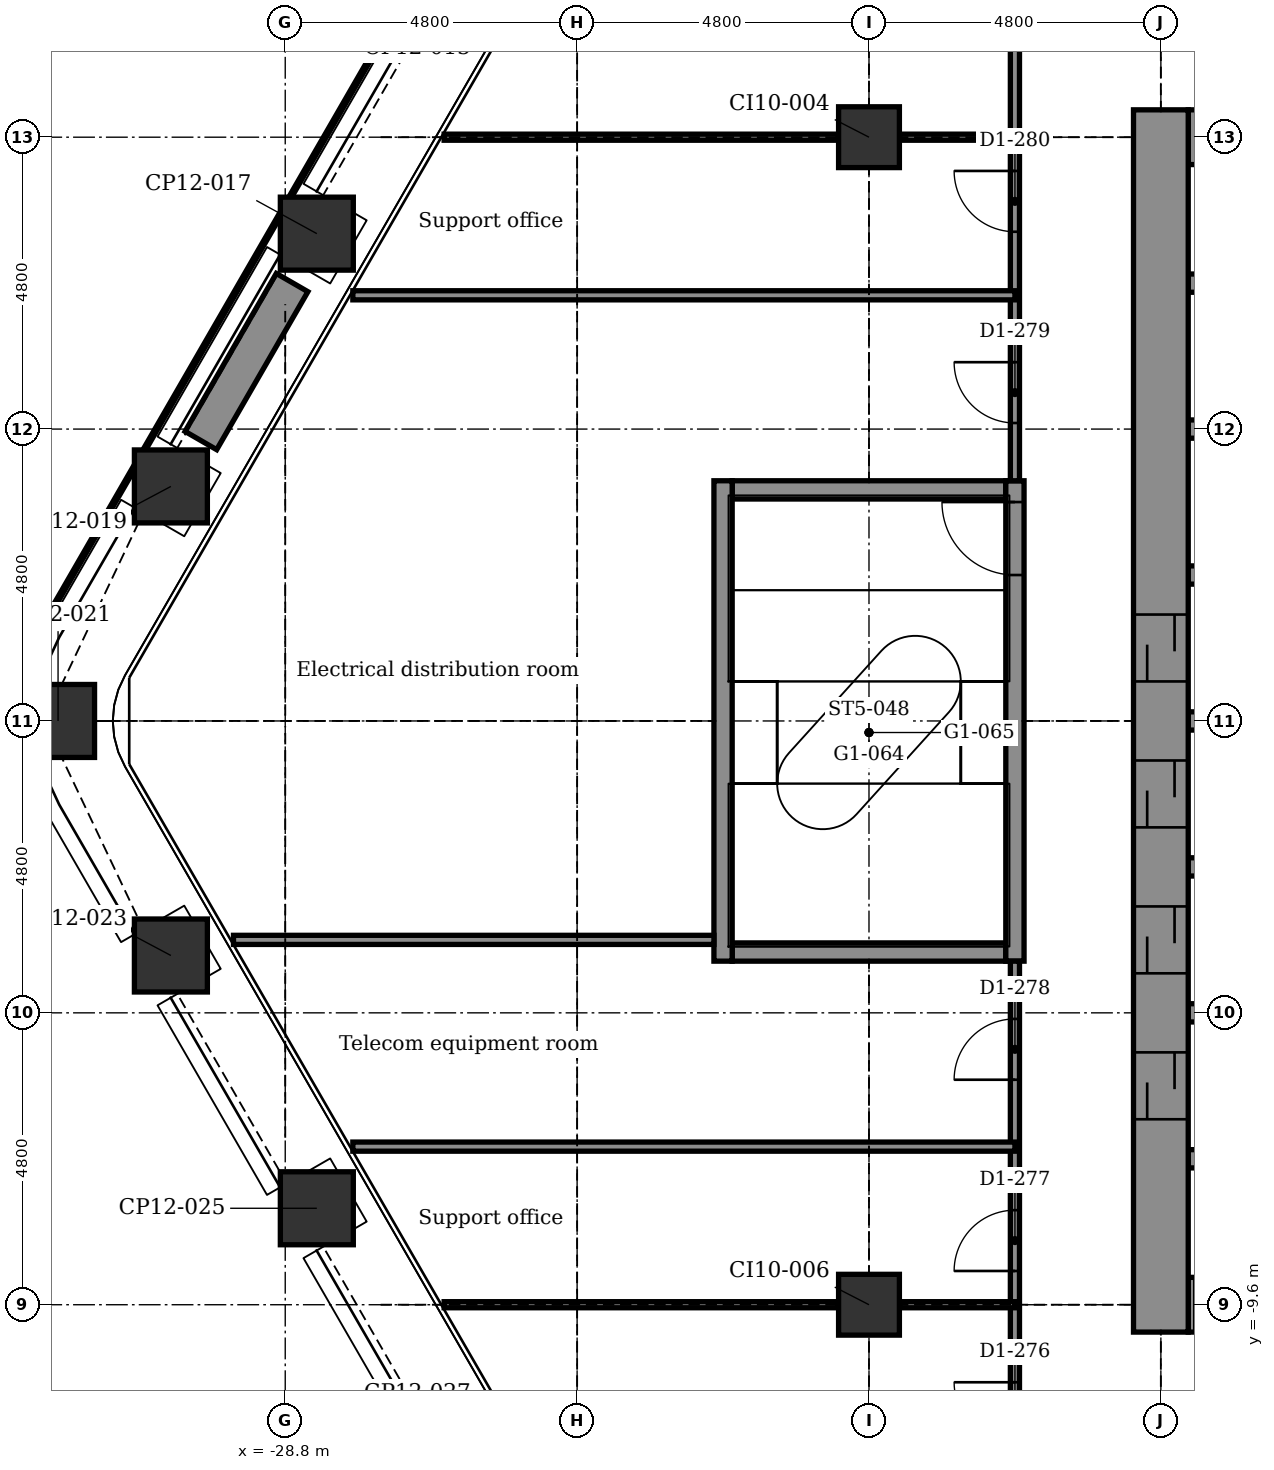
"""IFC4 building model, lengths in metres.
Left out: names, types, materials, properties, quantities, classifications, styles, units other than length and angle.
Written with IfcOpenShell. Run it as: python <this file> out.ifc"""

import sys

from ifc_helpers import new_model, si_unit, direction, frame, frame_2d, origin, origin_2d, place, context, subcontext, project, spatial, rectangle, extrude, element, fill, save


model = new_model("IFC4")
c1 = context("Model", 3, precision=1e-05, world=origin(), true_north=direction((0.0, 1.0)))
c2 = subcontext(c1, "Body", "Model", "MODEL_VIEW")
j1 = project(units=[si_unit("LENGTHUNIT", "METRE"), si_unit("PLANEANGLEUNIT", "RADIAN")], contexts=[c1])
p1 = place(None, origin())
s1 = spatial("IfcSite", under=j1, at=p1, CompositionType="ELEMENT")
p2 = place(p1, origin())
s2 = spatial("IfcBuilding", under=s1, at=p2, CompositionType="ELEMENT")
p3 = place(p2, frame((0.0, 0.0, 95.9)))
s3 = spatial("IfcBuildingStorey", under=s2, at=p3, CompositionType="ELEMENT", Elevation=95.9)
for number, where, z_axis, x_axis in (
    (1, (-28.28, -8.014, -0.2), (0.0, 0.0, 1.0), (0.866, 0.5, 0.0)),
    (2, (-30.68, -3.857, -0.2), (0.0, 0.0, 1.0), (0.866, 0.5, 0.0)),
    (3, (-32.536, 0.0, -0.2), (0.0, 0.0, 1.0), (1.0, 0.0, 0.0)),
    (4, (-30.68, 3.857, -0.2), (0.0, 0.0, 1.0), (0.5, 0.866, 0.0)),
    (5, (-28.28, 8.014, -0.2), (0.0, 0.0, 1.0), (0.5, 0.866, 0.0)),
):
    element("IfcColumn", number, at=place(p3, frame(where, z_axis=z_axis, x_axis=x_axis)), inside=s3, PredefinedType="COLUMN", context=c2, shape_type="SweptSolid", body=[
        extrude(rectangle(XDim=1.2, YDim=1.2, at=origin_2d()), origin(), (0.0, 0.0, 1.0), 4.5),
    ])
for number, where, z_axis, x_axis in (
    (6, (-19.2, -9.6, -0.2), (0.0, 0.0, 1.0), (1.0, 0.0, 0.0)),
    (7, (-19.2, 9.6, -0.2), (0.0, 0.0, 1.0), (1.0, 0.0, 0.0)),
):
    element("IfcColumn", number, at=place(p3, frame(where, z_axis=z_axis, x_axis=x_axis)), inside=s3, PredefinedType="COLUMN", context=c2, shape_type="SweptSolid", body=[
        extrude(rectangle(XDim=1.0, YDim=1.0, at=origin_2d()), origin(), (0.0, 0.0, 1.0), 4.5),
    ])
p4 = place(p3, frame((-13.95, -9.6, -0.2), z_axis=(0.0, 0.0, 1.0), x_axis=(1.0, 0.0, 0.0)))
e8 = element("IfcWall", 8, at=p4, inside=s3, PredefinedType="SHEAR", context=c2, shape_type="SweptSolid", body=[
    extrude(rectangle(XDim=3.9, YDim=0.9, at=frame_2d((1.95, 0.0))), origin(), (0.0, 0.0, 1.0), 4.5),
])
p5 = place(p4, frame((0.1, 0.0, 0.2)))
e9 = element("IfcOpeningElement", 9, at=p5, cuts=e8, PredefinedType="OPENING", context=c2, shape_type="SweptSolid", body=[
    extrude(rectangle(XDim=0.9, YDim=2.1, at=frame_2d((0.45, 1.05))), frame((0.0, 0.46, 0.0), z_axis=(0.0, -1.0, 0.0), x_axis=(1.0, 0.0, 0.0)), (0.0, 0.0, 1.0), 0.92),
])
p6 = place(p4, frame((2.5, 0.0, 0.2)))
e10 = element("IfcOpeningElement", 10, at=p6, cuts=e8, PredefinedType="OPENING", context=c2, shape_type="SweptSolid", body=[
    extrude(rectangle(XDim=0.9, YDim=2.1, at=frame_2d((0.45, 1.05))), frame((0.0, 0.46, 0.0), z_axis=(0.0, -1.0, 0.0), x_axis=(1.0, 0.0, 0.0)), (0.0, 0.0, 1.0), 0.92),
])
for number, where, z_axis, x_axis in (
    (11, (-13.95, -7.2, -0.2), (0.0, 0.0, 1.0), (1.0, 0.0, 0.0)),
    (12, (-13.95, -4.8, -0.2), (0.0, 0.0, 1.0), (1.0, 0.0, 0.0)),
):
    element("IfcWall", number, at=place(p3, frame(where, z_axis=z_axis, x_axis=x_axis)), inside=s3, PredefinedType="STANDARD", context=c2, shape_type="SweptSolid", body=[
        extrude(rectangle(XDim=3.9, YDim=0.3, at=frame_2d((1.95, 0.0))), origin(), (0.0, 0.0, 1.0), 4.5),
    ])
p7 = place(p3, frame((-21.45, -3.8, -0.2), z_axis=(0.0, 0.0, 1.0), x_axis=(1.0, 0.0, 0.0)))
e13 = element("IfcWall", 13, at=p7, inside=s3, PredefinedType="STANDARD", context=c2, shape_type="SweptSolid", body=[
    extrude(rectangle(XDim=4.5, YDim=0.3, at=frame_2d((2.25, 0.0))), origin(), (0.0, 0.0, 1.0), 4.5),
])
for number, where, z_axis, x_axis in (
    (14, (-13.95, -2.4, -0.2), (0.0, 0.0, 1.0), (1.0, 0.0, 0.0)),
    (15, (-13.95, 0.0, -0.2), (0.0, 0.0, 1.0), (1.0, 0.0, 0.0)),
    (16, (-13.95, 2.4, -0.2), (0.0, 0.0, 1.0), (1.0, 0.0, 0.0)),
):
    element("IfcWall", number, at=place(p3, frame(where, z_axis=z_axis, x_axis=x_axis)), inside=s3, PredefinedType="STANDARD", context=c2, shape_type="SweptSolid", body=[
        extrude(rectangle(XDim=2.8, YDim=0.3, at=frame_2d((1.4, 0.0))), origin(), (0.0, 0.0, 1.0), 4.5),
    ])
p8 = place(p3, frame((-21.45, 3.8, -0.2), z_axis=(0.0, 0.0, 1.0), x_axis=(1.0, 0.0, 0.0)))
e17 = element("IfcWall", 17, at=p8, inside=s3, PredefinedType="STANDARD", context=c2, shape_type="SweptSolid", body=[
    extrude(rectangle(XDim=4.5, YDim=0.3, at=frame_2d((2.25, 0.0))), origin(), (0.0, 0.0, 1.0), 4.5),
])
for number, where, z_axis, x_axis in (
    (18, (-13.95, 4.8, -0.2), (0.0, 0.0, 1.0), (1.0, 0.0, 0.0)),
    (19, (-13.95, 7.2, -0.2), (0.0, 0.0, 1.0), (1.0, 0.0, 0.0)),
):
    element("IfcWall", number, at=place(p3, frame(where, z_axis=z_axis, x_axis=x_axis)), inside=s3, PredefinedType="STANDARD", context=c2, shape_type="SweptSolid", body=[
        extrude(rectangle(XDim=3.9, YDim=0.3, at=frame_2d((1.95, 0.0))), origin(), (0.0, 0.0, 1.0), 4.5),
    ])
p9 = place(p3, frame((-13.95, 9.6, -0.2), z_axis=(0.0, 0.0, 1.0), x_axis=(1.0, 0.0, 0.0)))
e20 = element("IfcWall", 20, at=p9, inside=s3, PredefinedType="SHEAR", context=c2, shape_type="SweptSolid", body=[
    extrude(rectangle(XDim=3.9, YDim=0.9, at=frame_2d((1.95, 0.0))), origin(), (0.0, 0.0, 1.0), 4.5),
])
p10 = place(p9, frame((0.5, 0.0, 0.2)))
e21 = element("IfcOpeningElement", 21, at=p10, cuts=e20, PredefinedType="OPENING", context=c2, shape_type="SweptSolid", body=[
    extrude(rectangle(XDim=0.9, YDim=2.1, at=frame_2d((0.45, 1.05))), frame((0.0, 0.46, 0.0), z_axis=(0.0, -1.0, 0.0), x_axis=(1.0, 0.0, 0.0)), (0.0, 0.0, 1.0), 0.92),
])
p11 = place(p9, frame((2.9, 0.0, 0.2)))
e22 = element("IfcOpeningElement", 22, at=p11, cuts=e20, PredefinedType="OPENING", context=c2, shape_type="SweptSolid", body=[
    extrude(rectangle(XDim=0.9, YDim=2.1, at=frame_2d((0.45, 1.05))), frame((0.0, 0.46, 0.0), z_axis=(0.0, -1.0, 0.0), x_axis=(1.0, 0.0, 0.0)), (0.0, 0.0, 1.0), 0.92),
])
p12 = place(p3, frame((-21.6, -3.95, -0.2), z_axis=(0.0, 0.0, 1.0), x_axis=(0.0, 1.0, 0.0)))
e23 = element("IfcWall", 23, at=p12, inside=s3, PredefinedType="STANDARD", context=c2, shape_type="SweptSolid", body=[
    extrude(rectangle(XDim=7.9, YDim=0.3, at=frame_2d((3.95, 0.0))), origin(), (0.0, 0.0, 1.0), 4.5),
])
p13 = place(p3, frame((-16.8, -3.95, -0.2), z_axis=(0.0, 0.0, 1.0), x_axis=(0.0, 1.0, 0.0)))
e24 = element("IfcWall", 24, at=p13, inside=s3, PredefinedType="STANDARD", context=c2, shape_type="SweptSolid", body=[
    extrude(rectangle(XDim=7.9, YDim=0.3, at=frame_2d((3.95, 0.0))), origin(), (0.0, 0.0, 1.0), 4.5),
])
p14 = place(p13, frame((6.35, 0.0, 0.2)))
e25 = element("IfcOpeningElement", 25, at=p14, cuts=e24, PredefinedType="OPENING", context=c2, shape_type="SweptSolid", body=[
    extrude(rectangle(XDim=1.2, YDim=2.1, at=frame_2d((0.6, 1.05))), frame((0.0, 0.16, 0.0), z_axis=(0.0, -1.0, 0.0), x_axis=(1.0, 0.0, 0.0)), (0.0, 0.0, 1.0), 0.32),
])
p15 = place(p3, frame((-14.4, -10.05, -0.2), z_axis=(0.0, 0.0, 1.0), x_axis=(0.0, 1.0, 0.0)))
e26 = element("IfcWall", 26, at=p15, inside=s3, PredefinedType="SHEAR", context=c2, shape_type="SweptSolid", body=[
    extrude(rectangle(XDim=20.1, YDim=0.9, at=frame_2d((10.05, 0.0))), origin(), (0.0, 0.0, 1.0), 4.5),
])
p16 = place(p15, frame((3.5, 0.0, 0.2)))
e27 = element("IfcOpeningElement", 27, at=p16, cuts=e26, PredefinedType="OPENING", context=c2, shape_type="SweptSolid", body=[
    extrude(rectangle(XDim=1.1, YDim=2.1, at=frame_2d((0.55, 1.05))), frame((0.0, 0.46, 0.0), z_axis=(0.0, -1.0, 0.0), x_axis=(1.0, 0.0, 0.0)), (0.0, 0.0, 1.0), 0.92),
])
p17 = place(p15, frame((5.9, 0.0, 0.2)))
e28 = element("IfcOpeningElement", 28, at=p17, cuts=e26, PredefinedType="OPENING", context=c2, shape_type="SweptSolid", body=[
    extrude(rectangle(XDim=1.1, YDim=2.1, at=frame_2d((0.55, 1.05))), frame((0.0, 0.46, 0.0), z_axis=(0.0, -1.0, 0.0), x_axis=(1.0, 0.0, 0.0)), (0.0, 0.0, 1.0), 0.92),
])
p18 = place(p15, frame((8.3, 0.0, 0.2)))
e29 = element("IfcOpeningElement", 29, at=p18, cuts=e26, PredefinedType="OPENING", context=c2, shape_type="SweptSolid", body=[
    extrude(rectangle(XDim=1.1, YDim=2.1, at=frame_2d((0.55, 1.05))), frame((0.0, 0.46, 0.0), z_axis=(0.0, -1.0, 0.0), x_axis=(1.0, 0.0, 0.0)), (0.0, 0.0, 1.0), 0.92),
])
p19 = place(p15, frame((10.7, 0.0, 0.2)))
e30 = element("IfcOpeningElement", 30, at=p19, cuts=e26, PredefinedType="OPENING", context=c2, shape_type="SweptSolid", body=[
    extrude(rectangle(XDim=1.1, YDim=2.1, at=frame_2d((0.55, 1.05))), frame((0.0, 0.46, 0.0), z_axis=(0.0, -1.0, 0.0), x_axis=(1.0, 0.0, 0.0)), (0.0, 0.0, 1.0), 0.92),
])
p20 = place(p3, frame((-30.187, 4.611, 0.0), z_axis=(0.0, 0.0, 1.0), x_axis=(0.499990139034, 0.866031096941, 0.0)))
e31 = element("IfcWall", 31, at=p20, inside=s3, PredefinedType="USERDEFINED", context=c2, shape_type="SweptSolid", body=[
    extrude(rectangle(XDim=3.0, YDim=0.6, at=frame_2d((1.5, 0.0))), origin(), (0.0, 0.0, 1.0), 0.7),
])
p21 = place(p3, frame((-16.8, -13.6, 0.0), z_axis=(0.0, 0.0, 1.0), x_axis=(0.0, 1.0, 0.0)))
e32 = element("IfcWall", 32, at=p21, inside=s3, PredefinedType="PARTITIONING", context=c2, shape_type="SweptSolid", body=[
    extrude(rectangle(XDim=9.65, YDim=0.15, at=frame_2d((4.825, 0.0))), origin(), (0.0, 0.0, 1.0), 4.3),
])
p22 = place(p21, frame((1.725, 0.0, 0.0)))
e33 = element("IfcOpeningElement", 33, at=p22, cuts=e32, PredefinedType="OPENING", context=c2, shape_type="SweptSolid", body=[
    extrude(rectangle(XDim=1.0, YDim=2.1, at=frame_2d((0.5, 1.05))), frame((0.0, 0.085, 0.0), z_axis=(0.0, -1.0, 0.0), x_axis=(1.0, 0.0, 0.0)), (0.0, 0.0, 1.0), 0.17),
])
p23 = place(p21, frame((4.555, 0.0, 0.0)))
e34 = element("IfcOpeningElement", 34, at=p23, cuts=e32, PredefinedType="OPENING", context=c2, shape_type="SweptSolid", body=[
    extrude(rectangle(XDim=1.0, YDim=2.1, at=frame_2d((0.5, 1.05))), frame((0.0, 0.085, 0.0), z_axis=(0.0, -1.0, 0.0), x_axis=(1.0, 0.0, 0.0)), (0.0, 0.0, 1.0), 0.17),
])
p24 = place(p21, frame((7.7, 0.0, 0.0)))
e35 = element("IfcOpeningElement", 35, at=p24, cuts=e32, PredefinedType="OPENING", context=c2, shape_type="SweptSolid", body=[
    extrude(rectangle(XDim=1.0, YDim=2.1, at=frame_2d((0.5, 1.05))), frame((0.0, 0.085, 0.0), z_axis=(0.0, -1.0, 0.0), x_axis=(1.0, 0.0, 0.0)), (0.0, 0.0, 1.0), 0.17),
])
p25 = place(p3, frame((-16.8, 3.95, 0.0), z_axis=(0.0, 0.0, 1.0), x_axis=(0.0, 1.0, 0.0)))
e36 = element("IfcWall", 36, at=p25, inside=s3, PredefinedType="PARTITIONING", context=c2, shape_type="SweptSolid", body=[
    extrude(rectangle(XDim=9.65, YDim=0.15, at=frame_2d((4.825, 0.0))), origin(), (0.0, 0.0, 1.0), 4.3),
])
p26 = place(p25, frame((0.95, 0.0, 0.0)))
e37 = element("IfcOpeningElement", 37, at=p26, cuts=e36, PredefinedType="OPENING", context=c2, shape_type="SweptSolid", body=[
    extrude(rectangle(XDim=1.0, YDim=2.1, at=frame_2d((0.5, 1.05))), frame((0.0, 0.085, 0.0), z_axis=(0.0, -1.0, 0.0), x_axis=(1.0, 0.0, 0.0)), (0.0, 0.0, 1.0), 0.17),
])
p27 = place(p25, frame((4.095, 0.0, 0.0)))
e38 = element("IfcOpeningElement", 38, at=p27, cuts=e36, PredefinedType="OPENING", context=c2, shape_type="SweptSolid", body=[
    extrude(rectangle(XDim=1.0, YDim=2.1, at=frame_2d((0.5, 1.05))), frame((0.0, 0.085, 0.0), z_axis=(0.0, -1.0, 0.0), x_axis=(1.0, 0.0, 0.0)), (0.0, 0.0, 1.0), 0.17),
])
p28 = place(p25, frame((7.095, 0.0, 0.0)))
e39 = element("IfcOpeningElement", 39, at=p28, cuts=e36, PredefinedType="OPENING", context=c2, shape_type="SweptSolid", body=[
    extrude(rectangle(XDim=1.0, YDim=2.1, at=frame_2d((0.5, 1.05))), frame((0.0, 0.085, 0.0), z_axis=(0.0, -1.0, 0.0), x_axis=(1.0, 0.0, 0.0)), (0.0, 0.0, 1.0), 0.17),
])
p29 = place(p3, frame((-26.187, -9.6, 0.0), z_axis=(0.0, 0.0, 1.0), x_axis=(1.0, 0.0, 0.0)))
e40 = element("IfcWall", 40, at=p29, inside=s3, PredefinedType="PARTITIONING", context=c2, shape_type="SweptSolid", body=[
    extrude(rectangle(XDim=6.487, YDim=0.1, at=frame_2d((3.243, 0.0))), origin(), (0.0, 0.0, 1.0), 3.692),
])
p30 = place(p3, frame((-18.7, -9.6, 0.0), z_axis=(0.0, 0.0, 1.0), x_axis=(1.0, 0.0, 0.0)))
e41 = element("IfcWall", 41, at=p30, inside=s3, PredefinedType="PARTITIONING", context=c2, shape_type="SweptSolid", body=[
    extrude(rectangle(XDim=1.9, YDim=0.1, at=frame_2d((0.95, 0.0))), origin(), (0.0, 0.0, 1.0), 3.692),
])
p31 = place(p3, frame((-27.688, -7.0, 0.0), z_axis=(0.0, 0.0, 1.0), x_axis=(1.0, 0.0, 0.0)))
e42 = element("IfcWall", 42, at=p31, inside=s3, PredefinedType="PARTITIONING", context=c2, shape_type="SweptSolid", body=[
    extrude(rectangle(XDim=10.888, YDim=0.15, at=frame_2d((5.444, 0.0))), origin(), (0.0, 0.0, 1.0), 4.3),
])
p32 = place(p3, frame((-29.651, -3.6, 0.0), z_axis=(0.0, 0.0, 1.0), x_axis=(1.0, 0.0, 0.0)))
e43 = element("IfcWall", 43, at=p32, inside=s3, PredefinedType="PARTITIONING", context=c2, shape_type="SweptSolid", body=[
    extrude(rectangle(XDim=7.901, YDim=0.15, at=frame_2d((3.95, 0.0))), origin(), (0.0, 0.0, 1.0), 4.3),
])
p33 = place(p3, frame((-27.688, 7.0, 0.0), z_axis=(0.0, 0.0, 1.0), x_axis=(1.0, 0.0, 0.0)))
e44 = element("IfcWall", 44, at=p33, inside=s3, PredefinedType="PARTITIONING", context=c2, shape_type="SweptSolid", body=[
    extrude(rectangle(XDim=10.888, YDim=0.15, at=frame_2d((5.444, 0.0))), origin(), (0.0, 0.0, 1.0), 4.3),
])
p34 = place(p3, frame((-26.187, 9.6, 0.0), z_axis=(0.0, 0.0, 1.0), x_axis=(1.0, 0.0, 0.0)))
e45 = element("IfcWall", 45, at=p34, inside=s3, PredefinedType="PARTITIONING", context=c2, shape_type="SweptSolid", body=[
    extrude(rectangle(XDim=6.487, YDim=0.1, at=frame_2d((3.243, 0.0))), origin(), (0.0, 0.0, 1.0), 3.692),
])
p35 = place(p3, frame((-18.7, 9.6, 0.0), z_axis=(0.0, 0.0, 1.0), x_axis=(1.0, 0.0, 0.0)))
e46 = element("IfcWall", 46, at=p35, inside=s3, PredefinedType="PARTITIONING", context=c2, shape_type="SweptSolid", body=[
    extrude(rectangle(XDim=1.9, YDim=0.1, at=frame_2d((0.95, 0.0))), origin(), (0.0, 0.0, 1.0), 3.692),
])
p36 = place(p22, origin())
e47 = element("IfcDoor", 47, at=p36, inside=s3, OperationType="SINGLE_SWING_RIGHT", PredefinedType="DOOR", context=c2, shape_type="SweptSolid", body=[
    extrude(rectangle(XDim=1.0, YDim=2.1, at=frame_2d((0.5, 1.05))), frame((0.0, 0.025, 0.0), z_axis=(0.0, -1.0, 0.0), x_axis=(1.0, 0.0, 0.0)), (0.0, 0.0, 1.0), 0.05),
])
fill(e33, e47)
p37 = place(p23, origin())
e48 = element("IfcDoor", 48, at=p37, inside=s3, OperationType="SINGLE_SWING_LEFT", PredefinedType="DOOR", context=c2, shape_type="SweptSolid", body=[
    extrude(rectangle(XDim=1.0, YDim=2.1, at=frame_2d((0.5, 1.05))), frame((0.0, 0.025, 0.0), z_axis=(0.0, -1.0, 0.0), x_axis=(1.0, 0.0, 0.0)), (0.0, 0.0, 1.0), 0.05),
])
fill(e34, e48)
p38 = place(p24, origin())
e49 = element("IfcDoor", 49, at=p38, inside=s3, OperationType="SINGLE_SWING_LEFT", PredefinedType="DOOR", context=c2, shape_type="SweptSolid", body=[
    extrude(rectangle(XDim=1.0, YDim=2.1, at=frame_2d((0.5, 1.05))), frame((0.0, 0.025, 0.0), z_axis=(0.0, -1.0, 0.0), x_axis=(1.0, 0.0, 0.0)), (0.0, 0.0, 1.0), 0.05),
])
fill(e35, e49)
p39 = place(p26, origin())
e50 = element("IfcDoor", 50, at=p39, inside=s3, OperationType="SINGLE_SWING_RIGHT", PredefinedType="DOOR", context=c2, shape_type="SweptSolid", body=[
    extrude(rectangle(XDim=1.0, YDim=2.1, at=frame_2d((0.5, 1.05))), frame((0.0, 0.025, 0.0), z_axis=(0.0, -1.0, 0.0), x_axis=(1.0, 0.0, 0.0)), (0.0, 0.0, 1.0), 0.05),
])
fill(e37, e50)
p40 = place(p27, origin())
e51 = element("IfcDoor", 51, at=p40, inside=s3, OperationType="SINGLE_SWING_RIGHT", PredefinedType="DOOR", context=c2, shape_type="SweptSolid", body=[
    extrude(rectangle(XDim=1.0, YDim=2.1, at=frame_2d((0.5, 1.05))), frame((0.0, 0.025, 0.0), z_axis=(0.0, -1.0, 0.0), x_axis=(1.0, 0.0, 0.0)), (0.0, 0.0, 1.0), 0.05),
])
fill(e38, e51)
p41 = place(p16, origin())
e52 = element("IfcDoor", 52, at=p41, inside=s3, OperationType="DOUBLE_DOOR_SLIDING", PredefinedType="DOOR", context=c2, shape_type="SweptSolid", body=[
    extrude(rectangle(XDim=1.1, YDim=2.1, at=frame_2d((0.55, 1.05))), frame((0.0, 0.025, 0.0), z_axis=(0.0, -1.0, 0.0), x_axis=(1.0, 0.0, 0.0)), (0.0, 0.0, 1.0), 0.05),
])
fill(e27, e52)
p42 = place(p17, origin())
e53 = element("IfcDoor", 53, at=p42, inside=s3, OperationType="DOUBLE_DOOR_SLIDING", PredefinedType="DOOR", context=c2, shape_type="SweptSolid", body=[
    extrude(rectangle(XDim=1.1, YDim=2.1, at=frame_2d((0.55, 1.05))), frame((0.0, 0.025, 0.0), z_axis=(0.0, -1.0, 0.0), x_axis=(1.0, 0.0, 0.0)), (0.0, 0.0, 1.0), 0.05),
])
fill(e28, e53)
p43 = place(p18, origin())
e54 = element("IfcDoor", 54, at=p43, inside=s3, OperationType="DOUBLE_DOOR_SLIDING", PredefinedType="DOOR", context=c2, shape_type="SweptSolid", body=[
    extrude(rectangle(XDim=1.1, YDim=2.1, at=frame_2d((0.55, 1.05))), frame((0.0, 0.025, 0.0), z_axis=(0.0, -1.0, 0.0), x_axis=(1.0, 0.0, 0.0)), (0.0, 0.0, 1.0), 0.05),
])
fill(e29, e54)
p44 = place(p19, origin())
e55 = element("IfcDoor", 55, at=p44, inside=s3, OperationType="DOUBLE_DOOR_SLIDING", PredefinedType="DOOR", context=c2, shape_type="SweptSolid", body=[
    extrude(rectangle(XDim=1.1, YDim=2.1, at=frame_2d((0.55, 1.05))), frame((0.0, 0.025, 0.0), z_axis=(0.0, -1.0, 0.0), x_axis=(1.0, 0.0, 0.0)), (0.0, 0.0, 1.0), 0.05),
])
fill(e30, e55)
p45 = place(p14, origin())
e56 = element("IfcDoor", 56, at=p45, inside=s3, OperationType="SINGLE_SWING_RIGHT", PredefinedType="DOOR", context=c2, shape_type="SweptSolid", body=[
    extrude(rectangle(XDim=1.2, YDim=2.1, at=frame_2d((0.6, 1.05))), frame((0.0, 0.025, 0.0), z_axis=(0.0, -1.0, 0.0), x_axis=(1.0, 0.0, 0.0)), (0.0, 0.0, 1.0), 0.05),
])
fill(e25, e56)
save(model, sys.argv[1])
